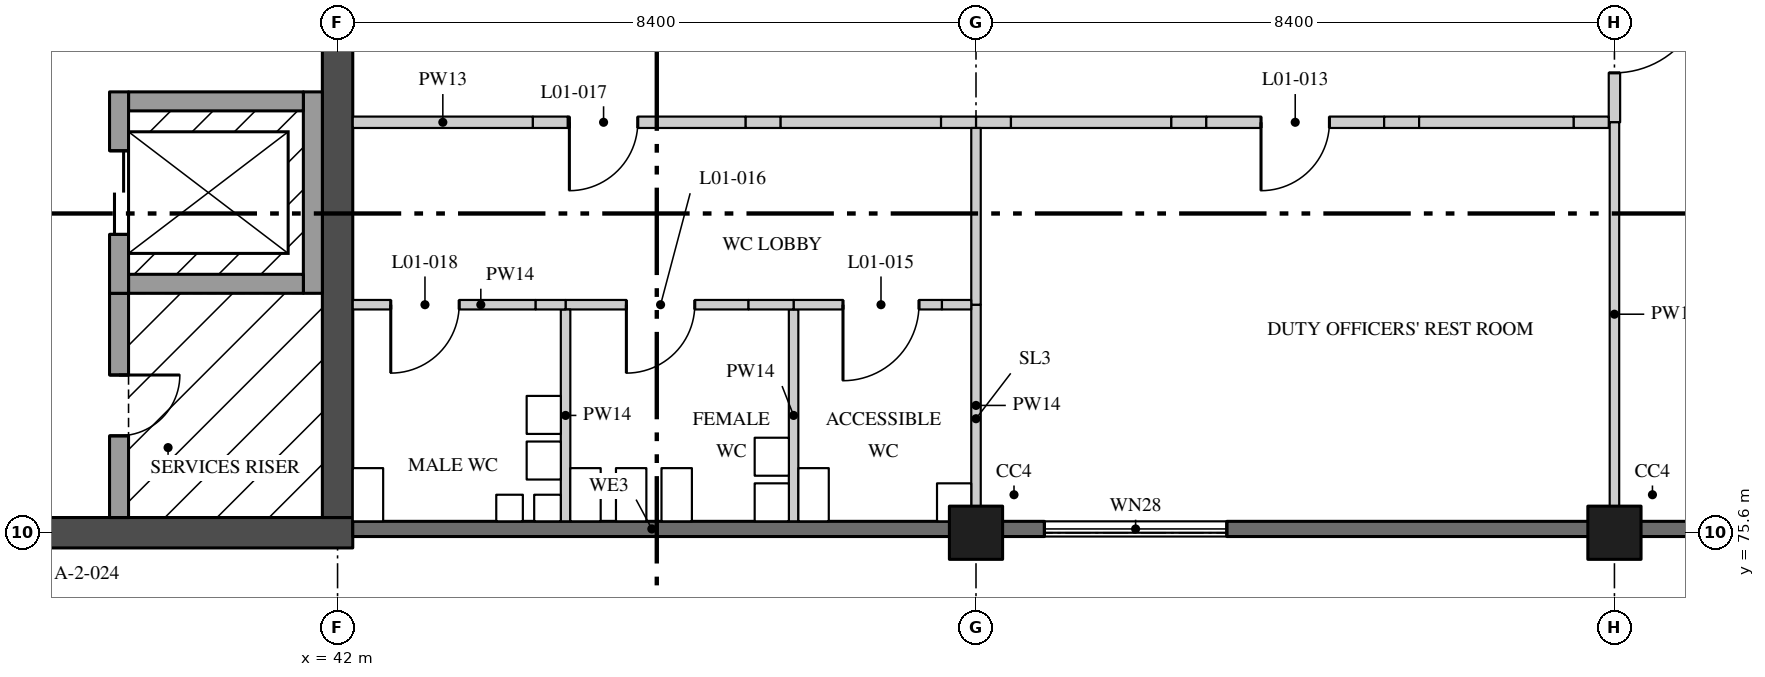
"""IFC4 building model, lengths in metres.
Left out: names, types, materials, properties, quantities, classifications, styles, units other than length and angle.
Written with IfcOpenShell. Run it as: python <this file> out.ifc"""

import sys

from ifc_helpers import new_model, si_unit, direction, frame, frame_2d, origin, origin_2d, place, context, subcontext, project, spatial, rectangle, extrude, element, fill, save


model = new_model("IFC4")
c1 = context("Model", 3, precision=1e-05, world=origin(), true_north=direction((0.0, 1.0)))
c2 = subcontext(c1, "Body", "Model", "MODEL_VIEW")
j1 = project(units=[si_unit("LENGTHUNIT", "METRE"), si_unit("PLANEANGLEUNIT", "RADIAN")], contexts=[c1])
p1 = place(None, origin())
s1 = spatial("IfcSite", under=j1, at=p1, CompositionType="ELEMENT")
p2 = place(p1, origin())
s2 = spatial("IfcBuilding", under=s1, at=p2, CompositionType="ELEMENT")
p3 = place(p2, frame((0.0, 0.0, 5.4)))
s3 = spatial("IfcBuildingStorey", under=s2, at=p3, CompositionType="ELEMENT", Elevation=5.4)
for number, where, z_axis, x_axis in (
    (1, (50.4, 75.6, 0.0), (0.0, 0.0, 1.0), (1.0, 0.0, 0.0)),
    (2, (58.8, 75.6, 0.0), (0.0, 0.0, 1.0), (1.0, 0.0, 0.0)),
):
    element("IfcColumn", number, at=place(p3, frame(where, z_axis=z_axis, x_axis=x_axis)), inside=s3, PredefinedType="COLUMN", context=c2, shape_type="SweptSolid", body=[
        extrude(rectangle(XDim=0.7, YDim=0.7, at=origin_2d()), origin(), (0.0, 0.0, 1.0), 4.37),
    ])
p4 = place(p3, frame((33.4, 75.6, 0.0), z_axis=(0.0, 0.0, 1.0), x_axis=(1.0, 0.0, 0.0)))
e3 = element("IfcWall", 3, at=p4, inside=s3, PredefinedType="SHEAR", context=c2, shape_type="SweptSolid", body=[
    extrude(rectangle(XDim=8.8, YDim=0.4, at=frame_2d((4.4, 0.0))), origin(), (0.0, 0.0, 1.0), 4.37),
])
p5 = place(p3, frame((42.0, 75.8, 0.0), z_axis=(0.0, 0.0, 1.0), x_axis=(0.0, 1.0, 0.0)))
e4 = element("IfcWall", 4, at=p5, inside=s3, PredefinedType="SHEAR", context=c2, shape_type="SweptSolid", body=[
    extrude(rectangle(XDim=8.0, YDim=0.4, at=frame_2d((4.0, 0.0))), origin(), (0.0, 0.0, 1.0), 4.37),
])
p6 = place(p5, frame((6.2, 0.0, 0.0)))
e5 = element("IfcOpeningElement", 5, at=p6, cuts=e4, PredefinedType="OPENING", context=c2, shape_type="SweptSolid", body=[
    extrude(rectangle(XDim=1.2, YDim=2.1, at=frame_2d((0.6, 1.05))), frame((0.0, 0.21, 0.0), z_axis=(0.0, -1.0, 0.0), x_axis=(1.0, 0.0, 0.0)), (0.0, 0.0, 1.0), 0.42),
])
p7 = place(p3, frame((39.125, 78.75, 0.0), z_axis=(0.0, 0.0, 1.0), x_axis=(0.0, -1.0, 0.0)))
e6 = element("IfcWall", 6, at=p7, inside=s3, PredefinedType="SOLIDWALL", context=c2, shape_type="SweptSolid", body=[
    extrude(rectangle(XDim=2.95, YDim=0.25, at=frame_2d((1.475, 0.0))), origin(), (0.0, 0.0, 1.0), 4.37),
])
p8 = place(p7, frame((1.075, 0.0, 0.0)))
e7 = element("IfcOpeningElement", 7, at=p8, cuts=e6, PredefinedType="OPENING", context=c2, shape_type="SweptSolid", body=[
    extrude(rectangle(XDim=0.8, YDim=2.1, at=frame_2d((0.4, 1.05))), frame((0.0, 0.135, 0.0), z_axis=(0.0, -1.0, 0.0), x_axis=(1.0, 0.0, 0.0)), (0.0, 0.0, 1.0), 0.27),
])
p9 = place(p3, frame((41.675, 78.75, 0.0), z_axis=(0.0, 0.0, 1.0), x_axis=(0.0, 1.0, 0.0)))
e8 = element("IfcWall", 8, at=p9, inside=s3, PredefinedType="SOLIDWALL", context=c2, shape_type="SweptSolid", body=[
    extrude(rectangle(XDim=2.65, YDim=0.25, at=frame_2d((1.325, 0.0))), origin(), (0.0, 0.0, 1.0), 4.37),
])
for number, where, z_axis, x_axis in (
    (9, (39.25, 81.275, 0.0), (0.0, 0.0, 1.0), (1.0, 0.0, 0.0)),
    (10, (39.25, 78.875, 0.0), (0.0, 0.0, 1.0), (1.0, 0.0, 0.0)),
):
    element("IfcWall", number, at=place(p3, frame(where, z_axis=z_axis, x_axis=x_axis)), inside=s3, PredefinedType="SOLIDWALL", context=c2, shape_type="SweptSolid", body=[
        extrude(rectangle(XDim=2.3, YDim=0.25, at=frame_2d((1.15, 0.0))), origin(), (0.0, 0.0, 1.0), 4.37),
    ])
p10 = place(p3, frame((39.125, 78.75, 0.0), z_axis=(0.0, 0.0, 1.0), x_axis=(0.0, 1.0, 0.0)))
e11 = element("IfcWall", 11, at=p10, inside=s3, PredefinedType="SOLIDWALL", context=c2, shape_type="SweptSolid", body=[
    extrude(rectangle(XDim=2.65, YDim=0.25, at=frame_2d((1.325, 0.0))), origin(), (0.0, 0.0, 1.0), 4.37),
])
p11 = place(p10, frame((0.775, 0.0, 0.0)))
e12 = element("IfcOpeningElement", 12, at=p11, cuts=e11, PredefinedType="OPENING", context=c2, shape_type="SweptSolid", body=[
    extrude(rectangle(XDim=1.1, YDim=2.1, at=frame_2d((0.55, 1.05))), frame((0.0, 0.135, 0.0), z_axis=(0.0, -1.0, 0.0), x_axis=(1.0, 0.0, 0.0)), (0.0, 0.0, 1.0), 0.27),
])
p12 = place(p3, frame((58.8, 81.0, 0.0), z_axis=(0.0, 0.0, 1.0), x_axis=(0.0, 1.0, 0.0)))
e13 = element("IfcWall", 13, at=p12, inside=s3, PredefinedType="PARTITIONING", context=c2, shape_type="SweptSolid", body=[
    extrude(rectangle(XDim=2.8, YDim=0.15, at=frame_2d((1.4, 0.0))), origin(), (0.0, 0.0, 1.0), 3.746),
])
p13 = place(p12, frame((0.65, 0.0, 0.0)))
e14 = element("IfcOpeningElement", 14, at=p13, cuts=e13, PredefinedType="OPENING", context=c2, shape_type="SweptSolid", body=[
    extrude(rectangle(XDim=1.2, YDim=2.4, at=frame_2d((0.6, 1.2))), frame((0.0, 0.085, 0.0), z_axis=(0.0, -1.0, 0.0), x_axis=(1.0, 0.0, 0.0)), (0.0, 0.0, 1.0), 0.17),
])
p14 = place(p3, frame((58.8, 75.95, 0.0), z_axis=(0.0, 0.0, 1.0), x_axis=(0.0, 1.0, 0.0)))
e15 = element("IfcWall", 15, at=p14, inside=s3, PredefinedType="PARTITIONING", context=c2, shape_type="SweptSolid", body=[
    extrude(rectangle(XDim=5.05, YDim=0.125, at=frame_2d((2.525, 0.0))), origin(), (0.0, 0.0, 1.0), 3.746),
])
p15 = place(p3, frame((50.4, 81.0, 0.0), z_axis=(0.0, 0.0, 1.0), x_axis=(1.0, 0.0, 0.0)))
e16 = element("IfcWall", 16, at=p15, inside=s3, PredefinedType="PARTITIONING", context=c2, shape_type="SweptSolid", body=[
    extrude(rectangle(XDim=0.46, YDim=0.15, at=frame_2d((0.23, 0.0))), origin(), (0.0, 0.0, 1.0), 3.746),
])
p16 = place(p3, frame((50.86, 81.0, 0.0), z_axis=(0.0, 0.0, 1.0), x_axis=(1.0, 0.0, 0.0)))
e17 = element("IfcWall", 17, at=p16, inside=s3, PredefinedType="PARTITIONING", context=c2, shape_type="SweptSolid", body=[
    extrude(rectangle(XDim=2.11, YDim=0.15, at=frame_2d((1.055, 0.0))), origin(), (0.0, 0.0, 1.0), 4.37),
])
p17 = place(p3, frame((52.97, 81.0, 0.0), z_axis=(0.0, 0.0, 1.0), x_axis=(1.0, 0.0, 0.0)))
e18 = element("IfcWall", 18, at=p17, inside=s3, PredefinedType="PARTITIONING", context=c2, shape_type="SweptSolid", body=[
    extrude(rectangle(XDim=0.46, YDim=0.15, at=frame_2d((0.23, 0.0))), origin(), (0.0, 0.0, 1.0), 3.895),
])
p18 = place(p3, frame((53.43, 81.0, 0.0), z_axis=(0.0, 0.0, 1.0), x_axis=(1.0, 0.0, 0.0)))
e19 = element("IfcWall", 19, at=p18, inside=s3, PredefinedType="PARTITIONING", context=c2, shape_type="SweptSolid", body=[
    extrude(rectangle(XDim=2.34, YDim=0.15, at=frame_2d((1.17, 0.0))), origin(), (0.0, 0.0, 1.0), 4.37),
])
p19 = place(p18, frame((0.72, 0.0, 0.0)))
e20 = element("IfcOpeningElement", 20, at=p19, cuts=e19, PredefinedType="OPENING", context=c2, shape_type="SweptSolid", body=[
    extrude(rectangle(XDim=0.9, YDim=2.1, at=frame_2d((0.45, 1.05))), frame((0.0, 0.085, 0.0), z_axis=(0.0, -1.0, 0.0), x_axis=(1.0, 0.0, 0.0)), (0.0, 0.0, 1.0), 0.17),
])
p20 = place(p3, frame((55.77, 81.0, 0.0), z_axis=(0.0, 0.0, 1.0), x_axis=(1.0, 0.0, 0.0)))
e21 = element("IfcWall", 21, at=p20, inside=s3, PredefinedType="PARTITIONING", context=c2, shape_type="SweptSolid", body=[
    extrude(rectangle(XDim=0.46, YDim=0.15, at=frame_2d((0.23, 0.0))), origin(), (0.0, 0.0, 1.0), 3.895),
])
p21 = place(p3, frame((56.23, 81.0, 0.0), z_axis=(0.0, 0.0, 1.0), x_axis=(1.0, 0.0, 0.0)))
e22 = element("IfcWall", 22, at=p21, inside=s3, PredefinedType="PARTITIONING", context=c2, shape_type="SweptSolid", body=[
    extrude(rectangle(XDim=2.035, YDim=0.15, at=frame_2d((1.018, 0.0))), origin(), (0.0, 0.0, 1.0), 4.37),
])
p22 = place(p3, frame((58.265, 81.0, 0.0), z_axis=(0.0, 0.0, 1.0), x_axis=(1.0, 0.0, 0.0)))
e23 = element("IfcWall", 23, at=p22, inside=s3, PredefinedType="PARTITIONING", context=c2, shape_type="SweptSolid", body=[
    extrude(rectangle(XDim=0.46, YDim=0.15, at=frame_2d((0.23, 0.0))), origin(), (0.0, 0.0, 1.0), 3.746),
])
p23 = place(p3, frame((42.2, 81.0, 0.0), z_axis=(0.0, 0.0, 1.0), x_axis=(1.0, 0.0, 0.0)))
e24 = element("IfcWall", 24, at=p23, inside=s3, PredefinedType="PARTITIONING", context=c2, shape_type="SweptSolid", body=[
    extrude(rectangle(XDim=2.37, YDim=0.15, at=frame_2d((1.185, 0.0))), origin(), (0.0, 0.0, 1.0), 4.37),
])
p24 = place(p3, frame((44.57, 81.0, 0.0), z_axis=(0.0, 0.0, 1.0), x_axis=(1.0, 0.0, 0.0)))
e25 = element("IfcWall", 25, at=p24, inside=s3, PredefinedType="PARTITIONING", context=c2, shape_type="SweptSolid", body=[
    extrude(rectangle(XDim=0.46, YDim=0.15, at=frame_2d((0.23, 0.0))), origin(), (0.0, 0.0, 1.0), 3.895),
])
p25 = place(p3, frame((45.03, 81.0, 0.0), z_axis=(0.0, 0.0, 1.0), x_axis=(1.0, 0.0, 0.0)))
e26 = element("IfcWall", 26, at=p25, inside=s3, PredefinedType="PARTITIONING", context=c2, shape_type="SweptSolid", body=[
    extrude(rectangle(XDim=2.34, YDim=0.15, at=frame_2d((1.17, 0.0))), origin(), (0.0, 0.0, 1.0), 4.37),
])
p26 = place(p25, frame((0.02, 0.0, 0.0)))
e27 = element("IfcOpeningElement", 27, at=p26, cuts=e26, PredefinedType="OPENING", context=c2, shape_type="SweptSolid", body=[
    extrude(rectangle(XDim=0.9, YDim=2.1, at=frame_2d((0.45, 1.05))), frame((0.0, 0.085, 0.0), z_axis=(0.0, -1.0, 0.0), x_axis=(1.0, 0.0, 0.0)), (0.0, 0.0, 1.0), 0.17),
])
p27 = place(p3, frame((47.37, 81.0, 0.0), z_axis=(0.0, 0.0, 1.0), x_axis=(1.0, 0.0, 0.0)))
e28 = element("IfcWall", 28, at=p27, inside=s3, PredefinedType="PARTITIONING", context=c2, shape_type="SweptSolid", body=[
    extrude(rectangle(XDim=0.46, YDim=0.15, at=frame_2d((0.23, 0.0))), origin(), (0.0, 0.0, 1.0), 3.895),
])
p28 = place(p3, frame((47.83, 81.0, 0.0), z_axis=(0.0, 0.0, 1.0), x_axis=(1.0, 0.0, 0.0)))
e29 = element("IfcWall", 29, at=p28, inside=s3, PredefinedType="PARTITIONING", context=c2, shape_type="SweptSolid", body=[
    extrude(rectangle(XDim=2.11, YDim=0.15, at=frame_2d((1.055, 0.0))), origin(), (0.0, 0.0, 1.0), 4.37),
])
p29 = place(p3, frame((49.94, 81.0, 0.0), z_axis=(0.0, 0.0, 1.0), x_axis=(1.0, 0.0, 0.0)))
e30 = element("IfcWall", 30, at=p29, inside=s3, PredefinedType="PARTITIONING", context=c2, shape_type="SweptSolid", body=[
    extrude(rectangle(XDim=0.46, YDim=0.15, at=frame_2d((0.23, 0.0))), origin(), (0.0, 0.0, 1.0), 3.746),
])
p30 = place(p3, frame((50.4, 75.95, 0.0), z_axis=(0.0, 0.0, 1.0), x_axis=(0.0, 1.0, 0.0)))
e31 = element("IfcWall", 31, at=p30, inside=s3, PredefinedType="PARTITIONING", context=c2, shape_type="SweptSolid", body=[
    extrude(rectangle(XDim=2.65, YDim=0.125, at=frame_2d((1.325, 0.0))), origin(), (0.0, 0.0, 1.0), 3.746),
])
p31 = place(p3, frame((50.4, 78.6, 0.0), z_axis=(0.0, 0.0, 1.0), x_axis=(0.0, 1.0, 0.0)))
e32 = element("IfcWall", 32, at=p31, inside=s3, PredefinedType="PARTITIONING", context=c2, shape_type="SweptSolid", body=[
    extrude(rectangle(XDim=2.325, YDim=0.125, at=frame_2d((1.163, 0.0))), origin(), (0.0, 0.0, 1.0), 3.746),
])
p32 = place(p3, frame((48.0, 75.75, 0.0), z_axis=(0.0, 0.0, 1.0), x_axis=(0.0, 1.0, 0.0)))
e33 = element("IfcWall", 33, at=p32, inside=s3, PredefinedType="PARTITIONING", context=c2, shape_type="SweptSolid", body=[
    extrude(rectangle(XDim=2.787, YDim=0.125, at=frame_2d((1.394, 0.0))), origin(), (0.0, 0.0, 1.0), 4.37),
])
p33 = place(p3, frame((48.0, 78.6, 0.0), z_axis=(0.0, 0.0, 1.0), x_axis=(1.0, 0.0, 0.0)))
e34 = element("IfcWall", 34, at=p33, inside=s3, PredefinedType="PARTITIONING", context=c2, shape_type="SweptSolid", body=[
    extrude(rectangle(XDim=1.952, YDim=0.125, at=frame_2d((0.976, 0.0))), origin(), (0.0, 0.0, 1.0), 4.37),
])
p34 = place(p33, frame((0.65, 0.0, 0.0)))
e35 = element("IfcOpeningElement", 35, at=p34, cuts=e34, PredefinedType="OPENING", context=c2, shape_type="SweptSolid", body=[
    extrude(rectangle(XDim=1.0, YDim=2.1, at=frame_2d((0.5, 1.05))), frame((0.0, 0.073, 0.0), z_axis=(0.0, -1.0, 0.0), x_axis=(1.0, 0.0, 0.0)), (0.0, 0.0, 1.0), 0.145),
])
p35 = place(p3, frame((49.952, 78.6, 0.0), z_axis=(0.0, 0.0, 1.0), x_axis=(1.0, 0.0, 0.0)))
e36 = element("IfcWall", 36, at=p35, inside=s3, PredefinedType="PARTITIONING", context=c2, shape_type="SweptSolid", body=[
    extrude(rectangle(XDim=0.385, YDim=0.125, at=frame_2d((0.192, 0.0))), origin(), (0.0, 0.0, 1.0), 3.746),
])
p36 = place(p3, frame((45.0, 78.6, 0.0), z_axis=(0.0, 0.0, 1.0), x_axis=(1.0, 0.0, 0.0)))
e37 = element("IfcWall", 37, at=p36, inside=s3, PredefinedType="PARTITIONING", context=c2, shape_type="SweptSolid", body=[
    extrude(rectangle(XDim=2.407, YDim=0.125, at=frame_2d((1.204, 0.0))), origin(), (0.0, 0.0, 1.0), 4.37),
])
p37 = place(p36, frame((0.8, 0.0, 0.0)))
e38 = element("IfcOpeningElement", 38, at=p37, cuts=e37, PredefinedType="OPENING", context=c2, shape_type="SweptSolid", body=[
    extrude(rectangle(XDim=0.9, YDim=2.1, at=frame_2d((0.45, 1.05))), frame((0.0, 0.073, 0.0), z_axis=(0.0, -1.0, 0.0), x_axis=(1.0, 0.0, 0.0)), (0.0, 0.0, 1.0), 0.145),
])
p38 = place(p3, frame((47.407, 78.6, 0.0), z_axis=(0.0, 0.0, 1.0), x_axis=(1.0, 0.0, 0.0)))
e39 = element("IfcWall", 39, at=p38, inside=s3, PredefinedType="PARTITIONING", context=c2, shape_type="SweptSolid", body=[
    extrude(rectangle(XDim=0.593, YDim=0.125, at=frame_2d((0.296, 0.0))), origin(), (0.0, 0.0, 1.0), 3.895),
])
p39 = place(p3, frame((45.0, 75.75, 0.0), z_axis=(0.0, 0.0, 1.0), x_axis=(0.0, 1.0, 0.0)))
e40 = element("IfcWall", 40, at=p39, inside=s3, PredefinedType="PARTITIONING", context=c2, shape_type="SweptSolid", body=[
    extrude(rectangle(XDim=2.787, YDim=0.125, at=frame_2d((1.394, 0.0))), origin(), (0.0, 0.0, 1.0), 4.37),
])
p40 = place(p3, frame((42.2, 78.6, 0.0), z_axis=(0.0, 0.0, 1.0), x_axis=(1.0, 0.0, 0.0)))
e41 = element("IfcWall", 41, at=p40, inside=s3, PredefinedType="PARTITIONING", context=c2, shape_type="SweptSolid", body=[
    extrude(rectangle(XDim=2.407, YDim=0.125, at=frame_2d((1.204, 0.0))), origin(), (0.0, 0.0, 1.0), 4.37),
])
p41 = place(p40, frame((0.5, 0.0, 0.0)))
e42 = element("IfcOpeningElement", 42, at=p41, cuts=e41, PredefinedType="OPENING", context=c2, shape_type="SweptSolid", body=[
    extrude(rectangle(XDim=0.9, YDim=2.1, at=frame_2d((0.45, 1.05))), frame((0.0, 0.073, 0.0), z_axis=(0.0, -1.0, 0.0), x_axis=(1.0, 0.0, 0.0)), (0.0, 0.0, 1.0), 0.145),
])
p42 = place(p3, frame((44.607, 78.6, 0.0), z_axis=(0.0, 0.0, 1.0), x_axis=(1.0, 0.0, 0.0)))
e43 = element("IfcWall", 43, at=p42, inside=s3, PredefinedType="PARTITIONING", context=c2, shape_type="SweptSolid", body=[
    extrude(rectangle(XDim=0.393, YDim=0.125, at=frame_2d((0.197, 0.0))), origin(), (0.0, 0.0, 1.0), 3.895),
])
p43 = place(p3, frame((42.2, 75.65, 0.0), z_axis=(0.0, 0.0, 1.0), x_axis=(1.0, 0.0, 0.0)))
e44 = element("IfcWall", 44, at=p43, inside=s3, PredefinedType="SOLIDWALL", context=c2, shape_type="SweptSolid", body=[
    extrude(rectangle(XDim=7.87, YDim=0.2, at=frame_2d((3.935, 0.0))), origin(), (0.0, 0.0, 1.0), 3.746),
])
p44 = place(p3, frame((50.73, 75.65, 0.0), z_axis=(0.0, 0.0, 1.0), x_axis=(1.0, 0.0, 0.0)))
e45 = element("IfcWall", 45, at=p44, inside=s3, PredefinedType="SOLIDWALL", context=c2, shape_type="SweptSolid", body=[
    extrude(rectangle(XDim=7.74, YDim=0.2, at=frame_2d((3.87, 0.0))), origin(), (0.0, 0.0, 1.0), 3.746),
])
p45 = place(p44, frame((0.57, 0.0, 0.9)))
e46 = element("IfcOpeningElement", 46, at=p45, cuts=e45, PredefinedType="OPENING", context=c2, shape_type="SweptSolid", body=[
    extrude(rectangle(XDim=2.4, YDim=2.1, at=frame_2d((1.2, 1.05))), frame((0.0, 0.11, 0.0), z_axis=(0.0, -1.0, 0.0), x_axis=(1.0, 0.0, 0.0)), (0.0, 0.0, 1.0), 0.22),
])
p46 = place(p3, frame((59.13, 75.65, 0.0), z_axis=(0.0, 0.0, 1.0), x_axis=(1.0, 0.0, 0.0)))
e47 = element("IfcWall", 47, at=p46, inside=s3, PredefinedType="SOLIDWALL", context=c2, shape_type="SweptSolid", body=[
    extrude(rectangle(XDim=7.74, YDim=0.2, at=frame_2d((3.87, 0.0))), origin(), (0.0, 0.0, 1.0), 3.746),
])
p47 = place(p46, frame((0.87, 0.0, 0.9)))
e48 = element("IfcOpeningElement", 48, at=p47, cuts=e47, PredefinedType="OPENING", context=c2, shape_type="SweptSolid", body=[
    extrude(rectangle(XDim=1.8, YDim=2.1, at=frame_2d((0.9, 1.05))), frame((0.0, 0.11, 0.0), z_axis=(0.0, -1.0, 0.0), x_axis=(1.0, 0.0, 0.0)), (0.0, 0.0, 1.0), 0.22),
])
p48 = place(p8, origin())
e49 = element("IfcDoor", 49, at=p48, inside=s3, OperationType="SINGLE_SWING_RIGHT", PredefinedType="DOOR", context=c2, shape_type="SweptSolid", body=[
    extrude(rectangle(XDim=0.8, YDim=2.1, at=frame_2d((0.4, 1.05))), frame((0.0, 0.035, 0.0), z_axis=(0.0, -1.0, 0.0), x_axis=(1.0, 0.0, 0.0)), (0.0, 0.0, 1.0), 0.07),
])
fill(e7, e49)
p49 = place(p11, origin())
e50 = element("IfcDoor", 50, at=p49, inside=s3, OperationType="DOUBLE_DOOR_SLIDING", PredefinedType="DOOR", context=c2, shape_type="SweptSolid", body=[
    extrude(rectangle(XDim=1.1, YDim=2.1, at=frame_2d((0.55, 1.05))), frame((0.0, 0.04, 0.0), z_axis=(0.0, -1.0, 0.0), x_axis=(1.0, 0.0, 0.0)), (0.0, 0.0, 1.0), 0.08),
])
fill(e12, e50)
p50 = place(p13, frame((1.2, 0.0, 0.0), z_axis=(0.0, 0.0, 1.0), x_axis=(-1.0, 0.0, 0.0)))
e51 = element("IfcDoor", 51, at=p50, inside=s3, OperationType="SINGLE_SWING_RIGHT", PredefinedType="DOOR", context=c2, shape_type="SweptSolid", body=[
    extrude(rectangle(XDim=1.2, YDim=2.4, at=frame_2d((0.6, 1.2))), frame((0.0, 0.025, 0.0), z_axis=(0.0, -1.0, 0.0), x_axis=(1.0, 0.0, 0.0)), (0.0, 0.0, 1.0), 0.05),
])
fill(e14, e51)
p51 = place(p19, frame((0.9, 0.0, 0.0), z_axis=(0.0, 0.0, 1.0), x_axis=(-1.0, 0.0, 0.0)))
e52 = element("IfcDoor", 52, at=p51, inside=s3, OperationType="SINGLE_SWING_LEFT", PredefinedType="DOOR", context=c2, shape_type="SweptSolid", body=[
    extrude(rectangle(XDim=0.9, YDim=2.1, at=frame_2d((0.45, 1.05))), frame((0.0, 0.025, 0.0), z_axis=(0.0, -1.0, 0.0), x_axis=(1.0, 0.0, 0.0)), (0.0, 0.0, 1.0), 0.05),
])
fill(e20, e52)
p52 = place(p34, frame((1.0, 0.0, 0.0), z_axis=(0.0, 0.0, 1.0), x_axis=(-1.0, 0.0, 0.0)))
e53 = element("IfcDoor", 53, at=p52, inside=s3, OperationType="SINGLE_SWING_LEFT", PredefinedType="DOOR", context=c2, shape_type="SweptSolid", body=[
    extrude(rectangle(XDim=1.0, YDim=2.1, at=frame_2d((0.5, 1.05))), frame((0.0, 0.02, 0.0), z_axis=(0.0, -1.0, 0.0), x_axis=(1.0, 0.0, 0.0)), (0.0, 0.0, 1.0), 0.04),
])
fill(e35, e53)
p53 = place(p37, frame((0.9, 0.0, 0.0), z_axis=(0.0, 0.0, 1.0), x_axis=(-1.0, 0.0, 0.0)))
e54 = element("IfcDoor", 54, at=p53, inside=s3, OperationType="SINGLE_SWING_LEFT", PredefinedType="DOOR", context=c2, shape_type="SweptSolid", body=[
    extrude(rectangle(XDim=0.9, YDim=2.1, at=frame_2d((0.45, 1.05))), frame((0.0, 0.02, 0.0), z_axis=(0.0, -1.0, 0.0), x_axis=(1.0, 0.0, 0.0)), (0.0, 0.0, 1.0), 0.04),
])
fill(e38, e54)
p54 = place(p26, frame((0.9, 0.0, 0.0), z_axis=(0.0, 0.0, 1.0), x_axis=(-1.0, 0.0, 0.0)))
e55 = element("IfcDoor", 55, at=p54, inside=s3, OperationType="SINGLE_SWING_LEFT", PredefinedType="DOOR", context=c2, shape_type="SweptSolid", body=[
    extrude(rectangle(XDim=0.9, YDim=2.1, at=frame_2d((0.45, 1.05))), frame((0.0, 0.025, 0.0), z_axis=(0.0, -1.0, 0.0), x_axis=(1.0, 0.0, 0.0)), (0.0, 0.0, 1.0), 0.05),
])
fill(e27, e55)
p55 = place(p41, frame((0.9, 0.0, 0.0), z_axis=(0.0, 0.0, 1.0), x_axis=(-1.0, 0.0, 0.0)))
e56 = element("IfcDoor", 56, at=p55, inside=s3, OperationType="SINGLE_SWING_LEFT", PredefinedType="DOOR", context=c2, shape_type="SweptSolid", body=[
    extrude(rectangle(XDim=0.9, YDim=2.1, at=frame_2d((0.45, 1.05))), frame((0.0, 0.02, 0.0), z_axis=(0.0, -1.0, 0.0), x_axis=(1.0, 0.0, 0.0)), (0.0, 0.0, 1.0), 0.04),
])
fill(e42, e56)
p56 = place(p45, origin())
e57 = element("IfcWindow", 57, at=p56, inside=s3, PartitioningType="SINGLE_PANEL", PredefinedType="WINDOW", context=c2, shape_type="SweptSolid", body=[
    extrude(rectangle(XDim=2.4, YDim=2.1, at=frame_2d((1.2, 1.05))), frame((0.0, 0.04, 0.0), z_axis=(0.0, -1.0, 0.0), x_axis=(1.0, 0.0, 0.0)), (0.0, 0.0, 1.0), 0.08),
])
fill(e46, e57)
save(model, sys.argv[1])
